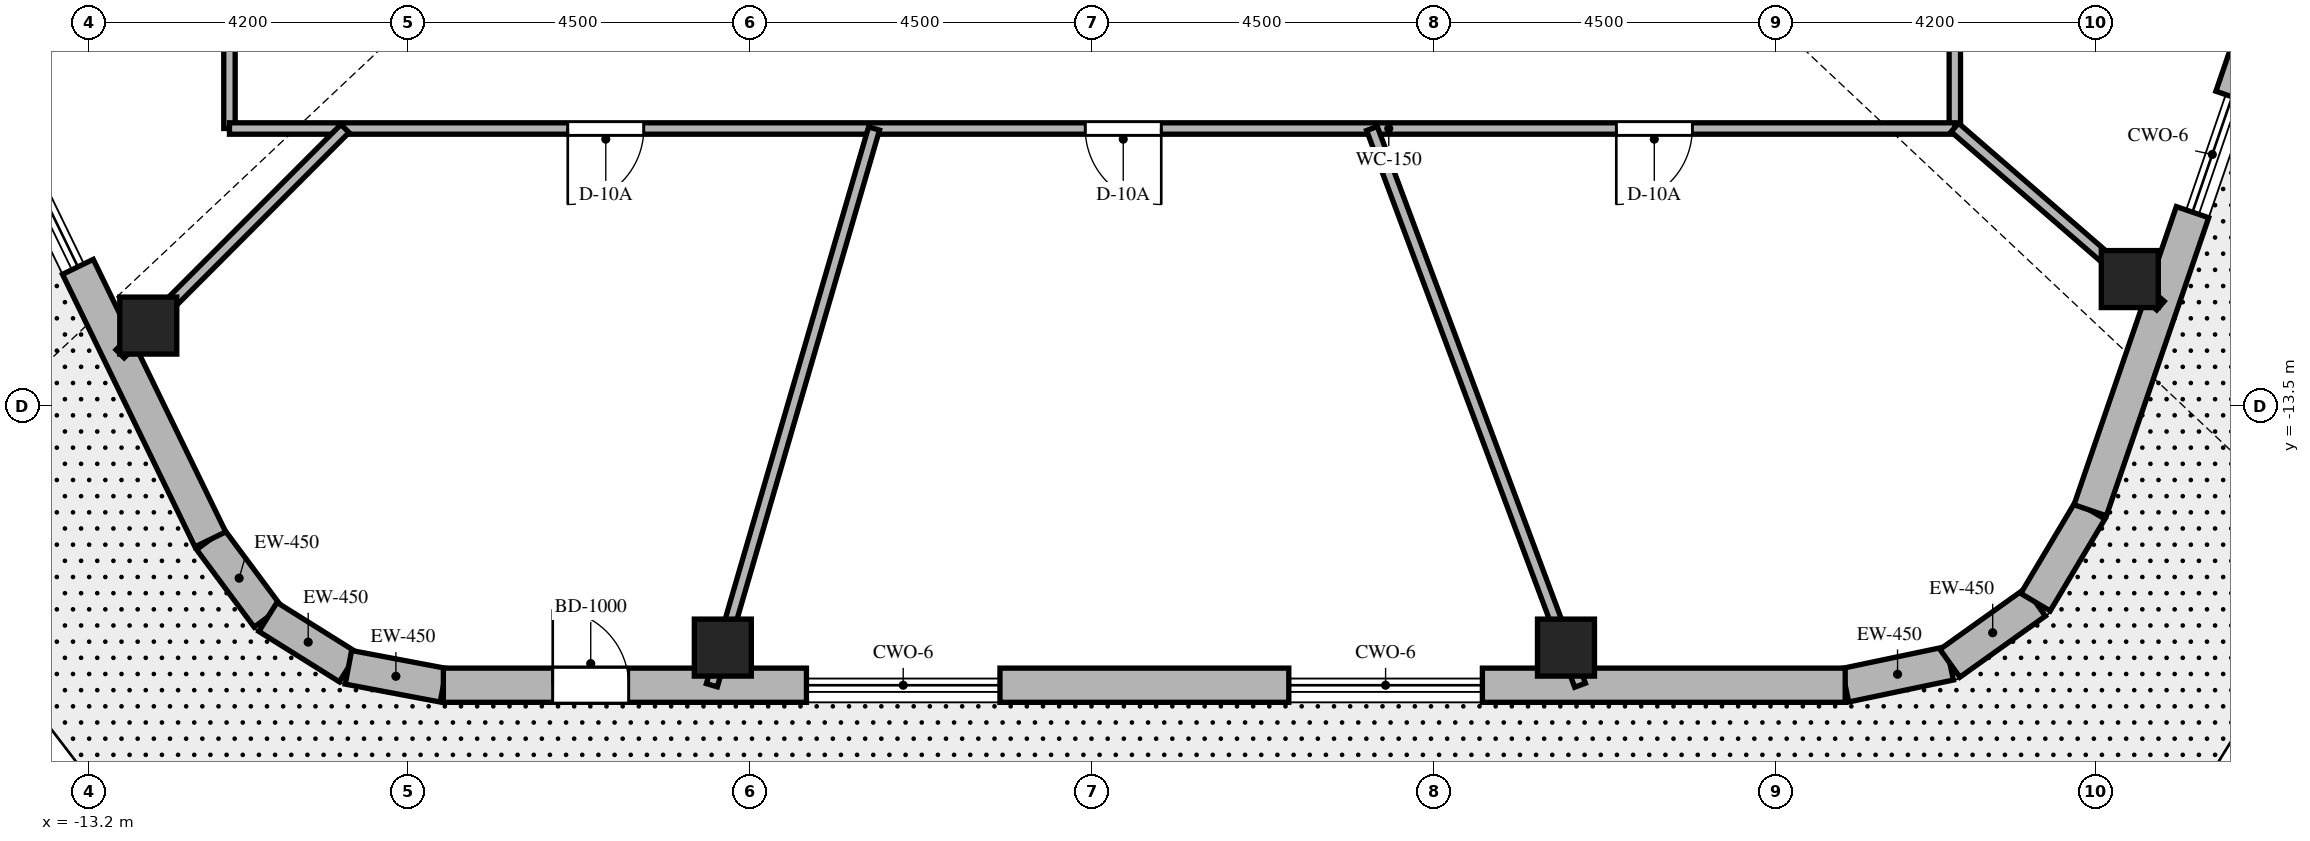
"""IFC4 building model, lengths in metres.
Left out: names, types, materials, properties, quantities, classifications, styles, units other than length and angle.
Written with IfcOpenShell. Run it as: python <this file> out.ifc"""

import sys

from ifc_helpers import new_model, si_unit, direction, frame, frame_2d, origin, origin_2d, place, context, subcontext, project, spatial, rectangle, extrude, element, fill, save


model = new_model("IFC4")
c1 = context("Model", 3, precision=1e-05, world=origin(), true_north=direction((0.0, 1.0)))
c2 = subcontext(c1, "Body", "Model", "MODEL_VIEW")
j1 = project(units=[si_unit("LENGTHUNIT", "METRE"), si_unit("PLANEANGLEUNIT", "RADIAN")], contexts=[c1])
p1 = place(None, origin())
s1 = spatial("IfcSite", under=j1, at=p1, CompositionType="ELEMENT")
p2 = place(p1, origin())
s2 = spatial("IfcBuilding", under=s1, at=p2, CompositionType="ELEMENT")
p3 = place(p2, frame((0.0, 0.0, 305.4)))
s3 = spatial("IfcBuildingStorey", under=s2, at=p3, CompositionType="ELEMENT", Elevation=305.4)
for number, where, z_axis, x_axis in (
    (1, (-4.859, -16.68, 0.0), (0.0, 0.0, 1.0), (1.0, 0.0, 0.0)),
    (2, (6.234, -16.68, 0.0), (0.0, 0.0, 1.0), (1.0, 0.0, 0.0)),
    (3, (13.652, -11.831, 0.0), (0.0, 0.0, 1.0), (1.0, 0.0, 0.0)),
    (4, (-12.418, -12.443, 0.0), (0.0, 0.0, 1.0), (1.0, 0.0, 0.0)),
):
    element("IfcColumn", number, at=place(p3, frame(where, z_axis=z_axis, x_axis=x_axis)), inside=s3, PredefinedType="COLUMN", context=c2, shape_type="SweptSolid", body=[
        extrude(rectangle(XDim=0.75, YDim=0.75, at=origin_2d()), origin(), (0.0, 0.0, 1.0), 5.0),
    ])
p4 = place(p3, frame((-11.602, -15.256, 0.0), z_axis=(0.0, 0.0, 1.0), x_axis=(0.596058719353, -0.802940846566, 0.0)))
e5 = element("IfcWall", 5, at=p4, inside=s3, PredefinedType="SOLIDWALL", context=c2, shape_type="SweptSolid", body=[
    extrude(rectangle(XDim=1.271, YDim=0.45, at=frame_2d((0.635, 0.0))), origin(), (0.0, 0.0, 1.0), 4.68),
])
p5 = place(p3, frame((-10.844, -16.277, 0.0), z_axis=(0.0, 0.0, 1.0), x_axis=(0.847723789959, -0.530437909597, 0.0)))
e6 = element("IfcWall", 6, at=p5, inside=s3, PredefinedType="SOLIDWALL", context=c2, shape_type="SweptSolid", body=[
    extrude(rectangle(XDim=1.25, YDim=0.45, at=frame_2d((0.625, 0.0))), origin(), (0.0, 0.0, 1.0), 4.68),
])
p6 = place(p3, frame((-9.785, -16.939, 0.0), z_axis=(0.0, 0.0, 1.0), x_axis=(0.982664955661, -0.185390358204, 0.0)))
e7 = element("IfcWall", 7, at=p6, inside=s3, PredefinedType="SOLIDWALL", context=c2, shape_type="SweptSolid", body=[
    extrude(rectangle(XDim=1.271, YDim=0.45, at=frame_2d((0.635, 0.0))), origin(), (0.0, 0.0, 1.0), 4.68),
])
p7 = place(p3, frame((9.908, -17.175, 0.0), z_axis=(0.0, 0.0, 1.0), x_axis=(0.978709642506, 0.205249691027, 0.0)))
e8 = element("IfcWall", 8, at=p7, inside=s3, PredefinedType="SOLIDWALL", context=c2, shape_type="SweptSolid", body=[
    extrude(rectangle(XDim=1.407, YDim=0.45, at=frame_2d((0.704, 0.0))), origin(), (0.0, 0.0, 1.0), 4.68),
])
p8 = place(p3, frame((11.285, -16.886, 0.0), z_axis=(0.0, 0.0, 1.0), x_axis=(0.813840765051, 0.581087953017, 0.0)))
e9 = element("IfcWall", 9, at=p8, inside=s3, PredefinedType="SOLIDWALL", context=c2, shape_type="SweptSolid", body=[
    extrude(rectangle(XDim=1.384, YDim=0.45, at=frame_2d((0.692, 0.0))), origin(), (0.0, 0.0, 1.0), 4.68),
])
p9 = place(p3, frame((12.411, -16.082, 0.0), z_axis=(0.0, 0.0, 1.0), x_axis=(0.511788829014, 0.859111281789, 0.0)))
e10 = element("IfcWall", 10, at=p9, inside=s3, PredefinedType="SOLIDWALL", context=c2, shape_type="SweptSolid", body=[
    extrude(rectangle(XDim=1.407, YDim=0.45, at=frame_2d((0.704, 0.0))), origin(), (0.0, 0.0, 1.0), 4.68),
])
p10 = place(p3, frame((-8.536, -17.175, 0.0), z_axis=(0.0, 0.0, 1.0), x_axis=(1.0, 0.0, 0.0)))
e11 = element("IfcWall", 11, at=p10, inside=s3, PredefinedType="SOLIDWALL", context=c2, shape_type="SweptSolid", body=[
    extrude(rectangle(XDim=4.777, YDim=0.45, at=frame_2d((2.389, 0.0))), origin(), (0.0, 0.0, 1.0), 4.68),
])
p11 = place(p10, frame((1.439, 0.0, 0.0)))
e12 = element("IfcOpeningElement", 12, at=p11, cuts=e11, PredefinedType="OPENING", context=c2, shape_type="SweptSolid", body=[
    extrude(rectangle(XDim=1.0, YDim=2.15, at=frame_2d((0.5, 1.075))), frame((0.0, 0.235, 0.0), z_axis=(0.0, -1.0, 0.0), x_axis=(1.0, 0.0, 0.0)), (0.0, 0.0, 1.0), 0.47),
])
p12 = place(p3, frame((-1.213, -17.175, 0.0), z_axis=(0.0, 0.0, 1.0), x_axis=(1.0, 0.0, 0.0)))
e13 = element("IfcWall", 13, at=p12, inside=s3, PredefinedType="SOLIDWALL", context=c2, shape_type="SweptSolid", body=[
    extrude(rectangle(XDim=3.8, YDim=0.45, at=frame_2d((1.9, 0.0))), origin(), (0.0, 0.0, 1.0), 4.68),
])
p13 = place(p3, frame((5.134, -17.175, 0.0), z_axis=(0.0, 0.0, 1.0), x_axis=(1.0, 0.0, 0.0)))
e14 = element("IfcWall", 14, at=p13, inside=s3, PredefinedType="SOLIDWALL", context=c2, shape_type="SweptSolid", body=[
    extrude(rectangle(XDim=4.773, YDim=0.45, at=frame_2d((2.387, 0.0))), origin(), (0.0, 0.0, 1.0), 4.68),
])
p14 = place(p3, frame((13.131, -14.873, 0.0), z_axis=(0.0, 0.0, 1.0), x_axis=(0.324498911717, 0.945886069405, 0.0)))
e15 = element("IfcWall", 15, at=p14, inside=s3, PredefinedType="SOLIDWALL", context=c2, shape_type="SweptSolid", body=[
    extrude(rectangle(XDim=4.147, YDim=0.45, at=frame_2d((2.073, 0.0))), origin(), (0.0, 0.0, 1.0), 4.68),
])
p15 = place(p3, frame((14.998, -9.433, 0.0), z_axis=(0.0, 0.0, 1.0), x_axis=(0.324503351443, 0.945884546286, 0.0)))
e16 = element("IfcWall", 16, at=p15, inside=s3, PredefinedType="SOLIDWALL", context=c2, shape_type="SweptSolid", body=[
    extrude(rectangle(XDim=3.8, YDim=0.45, at=frame_2d((1.9, 0.0))), origin(), (0.0, 0.0, 1.0), 4.68),
])
p16 = place(p3, frame((-13.344, -11.67, 0.0), z_axis=(0.0, 0.0, 1.0), x_axis=(0.437044105444, -0.899440075768, 0.0)))
e17 = element("IfcWall", 17, at=p16, inside=s3, PredefinedType="SOLIDWALL", context=c2, shape_type="SweptSolid", body=[
    extrude(rectangle(XDim=3.987, YDim=0.45, at=frame_2d((1.993, 0.0))), origin(), (0.0, 0.0, 1.0), 4.68),
])
p17 = place(p3, frame((-11.35, -9.85, 0.0), z_axis=(0.0, 0.0, 1.0), x_axis=(0.0, 1.0, 0.0)))
e18 = element("IfcWall", 18, at=p17, inside=s3, PredefinedType="PARTITIONING", context=c2, shape_type="SweptSolid", body=[
    extrude(rectangle(XDim=19.7, YDim=0.15, at=frame_2d((9.85, 0.0))), origin(), (0.0, 0.0, 1.0), 2.87),
])
p18 = place(p17, frame((15.219, 0.0, 0.0)))
e19 = element("IfcOpeningElement", 19, at=p18, cuts=e18, PredefinedType="OPENING", context=c2, shape_type="SweptSolid", body=[
    extrude(rectangle(XDim=1.0, YDim=2.03, at=frame_2d((0.5, 1.015))), frame((0.0, 0.085, 0.0), z_axis=(0.0, -1.0, 0.0), x_axis=(1.0, 0.0, 0.0)), (0.0, 0.0, 1.0), 0.17),
])
p19 = place(p17, frame((8.805, 0.0, 0.0)))
e20 = element("IfcOpeningElement", 20, at=p19, cuts=e18, PredefinedType="OPENING", context=c2, shape_type="SweptSolid", body=[
    extrude(rectangle(XDim=1.0, YDim=2.03, at=frame_2d((0.5, 1.015))), frame((0.0, 0.085, 0.0), z_axis=(0.0, -1.0, 0.0), x_axis=(1.0, 0.0, 0.0)), (0.0, 0.0, 1.0), 0.17),
])
p20 = place(p17, frame((2.938, 0.0, 0.0)))
e21 = element("IfcOpeningElement", 21, at=p20, cuts=e18, PredefinedType="OPENING", context=c2, shape_type="SweptSolid", body=[
    extrude(rectangle(XDim=1.0, YDim=2.03, at=frame_2d((0.5, 1.015))), frame((0.0, 0.085, 0.0), z_axis=(0.0, -1.0, 0.0), x_axis=(1.0, 0.0, 0.0)), (0.0, 0.0, 1.0), 0.17),
])
p21 = place(p3, frame((11.35, 9.85, 0.0), z_axis=(0.0, 0.0, 1.0), x_axis=(0.0, -1.0, 0.0)))
e22 = element("IfcWall", 22, at=p21, inside=s3, PredefinedType="PARTITIONING", context=c2, shape_type="SweptSolid", body=[
    extrude(rectangle(XDim=19.7, YDim=0.15, at=frame_2d((9.85, 0.0))), origin(), (0.0, 0.0, 1.0), 2.87),
])
p22 = place(p21, frame((2.938, 0.0, 0.0)))
e23 = element("IfcOpeningElement", 23, at=p22, cuts=e22, PredefinedType="OPENING", context=c2, shape_type="SweptSolid", body=[
    extrude(rectangle(XDim=1.0, YDim=2.03, at=frame_2d((0.5, 1.015))), frame((0.0, 0.085, 0.0), z_axis=(0.0, -1.0, 0.0), x_axis=(1.0, 0.0, 0.0)), (0.0, 0.0, 1.0), 0.17),
])
p23 = place(p21, frame((15.219, 0.0, 0.0)))
e24 = element("IfcOpeningElement", 24, at=p23, cuts=e22, PredefinedType="OPENING", context=c2, shape_type="SweptSolid", body=[
    extrude(rectangle(XDim=1.0, YDim=2.03, at=frame_2d((0.5, 1.015))), frame((0.0, 0.085, 0.0), z_axis=(0.0, -1.0, 0.0), x_axis=(1.0, 0.0, 0.0)), (0.0, 0.0, 1.0), 0.17),
])
p24 = place(p21, frame((8.805, 0.0, 0.0)))
e25 = element("IfcOpeningElement", 25, at=p24, cuts=e22, PredefinedType="OPENING", context=c2, shape_type="SweptSolid", body=[
    extrude(rectangle(XDim=1.0, YDim=2.03, at=frame_2d((0.5, 1.015))), frame((0.0, 0.085, 0.0), z_axis=(0.0, -1.0, 0.0), x_axis=(1.0, 0.0, 0.0)), (0.0, 0.0, 1.0), 0.17),
])
p25 = place(p3, frame((11.35, -9.85, 0.0), z_axis=(0.0, 0.0, 1.0), x_axis=(-1.0, 0.0, 0.0)))
e26 = element("IfcWall", 26, at=p25, inside=s3, PredefinedType="PARTITIONING", context=c2, shape_type="SweptSolid", body=[
    extrude(rectangle(XDim=22.7, YDim=0.15, at=frame_2d((11.35, 0.0))), origin(), (0.0, 0.0, 1.0), 2.87),
])
p26 = place(p25, frame((17.249, 0.0, 0.0)))
e27 = element("IfcOpeningElement", 27, at=p26, cuts=e26, PredefinedType="OPENING", context=c2, shape_type="SweptSolid", body=[
    extrude(rectangle(XDim=1.0, YDim=2.03, at=frame_2d((0.5, 1.015))), frame((0.0, 0.085, 0.0), z_axis=(0.0, -1.0, 0.0), x_axis=(1.0, 0.0, 0.0)), (0.0, 0.0, 1.0), 0.17),
])
p27 = place(p25, frame((10.441, 0.0, 0.0)))
e28 = element("IfcOpeningElement", 28, at=p27, cuts=e26, PredefinedType="OPENING", context=c2, shape_type="SweptSolid", body=[
    extrude(rectangle(XDim=1.0, YDim=2.03, at=frame_2d((0.5, 1.015))), frame((0.0, 0.085, 0.0), z_axis=(0.0, -1.0, 0.0), x_axis=(1.0, 0.0, 0.0)), (0.0, 0.0, 1.0), 0.17),
])
p28 = place(p25, frame((3.454, 0.0, 0.0)))
e29 = element("IfcOpeningElement", 29, at=p28, cuts=e26, PredefinedType="OPENING", context=c2, shape_type="SweptSolid", body=[
    extrude(rectangle(XDim=1.0, YDim=2.03, at=frame_2d((0.5, 1.015))), frame((0.0, 0.085, 0.0), z_axis=(0.0, -1.0, 0.0), x_axis=(1.0, 0.0, 0.0)), (0.0, 0.0, 1.0), 0.17),
])
p29 = place(p3, frame((-9.83, -9.85, 0.0), z_axis=(0.0, 0.0, 1.0), x_axis=(-0.706435999186, -0.707776927467, 0.0)))
e30 = element("IfcWall", 30, at=p29, inside=s3, PredefinedType="PARTITIONING", context=c2, shape_type="SweptSolid", body=[
    extrude(rectangle(XDim=4.188, YDim=0.15, at=frame_2d((2.094, 0.0))), origin(), (0.0, 0.0, 1.0), 2.87),
])
p30 = place(p3, frame((-2.869, -9.85, 0.0), z_axis=(0.0, 0.0, 1.0), x_axis=(-0.279679268414, -0.960093488583, 0.0)))
e31 = element("IfcWall", 31, at=p30, inside=s3, PredefinedType="PARTITIONING", context=c2, shape_type="SweptSolid", body=[
    extrude(rectangle(XDim=7.629, YDim=0.15, at=frame_2d((3.815, 0.0))), origin(), (0.0, 0.0, 1.0), 2.87),
])
p31 = place(p3, frame((3.681, -9.85, 0.0), z_axis=(0.0, 0.0, 1.0), x_axis=(0.350079676448, -0.936719926199, 0.0)))
e32 = element("IfcWall", 32, at=p31, inside=s3, PredefinedType="PARTITIONING", context=c2, shape_type="SweptSolid", body=[
    extrude(rectangle(XDim=7.82, YDim=0.15, at=frame_2d((3.91, 0.0))), origin(), (0.0, 0.0, 1.0), 2.87),
])
p32 = place(p3, frame((11.35, -9.836, 0.0), z_axis=(0.0, 0.0, 1.0), x_axis=(0.755716089778, -0.65489937521, 0.0)))
e33 = element("IfcWall", 33, at=p32, inside=s3, PredefinedType="PARTITIONING", context=c2, shape_type="SweptSolid", body=[
    extrude(rectangle(XDim=3.579, YDim=0.15, at=frame_2d((1.79, 0.0))), origin(), (0.0, 0.0, 1.0), 2.87),
])
p33 = place(p11, origin())
e34 = element("IfcDoor", 34, at=p33, inside=s3, OperationType="SINGLE_SWING_LEFT", PredefinedType="DOOR", context=c2, shape_type="SweptSolid", body=[
    extrude(rectangle(XDim=1.0, YDim=2.15, at=frame_2d((0.5, 1.075))), frame((0.0, 0.025, 0.0), z_axis=(0.0, -1.0, 0.0), x_axis=(1.0, 0.0, 0.0)), (0.0, 0.0, 1.0), 0.05),
])
fill(e12, e34)
p34 = place(p26, origin())
e35 = element("IfcDoor", 35, at=p34, inside=s3, OperationType="SINGLE_SWING_RIGHT", PredefinedType="DOOR", context=c2, shape_type="SweptSolid", body=[
    extrude(rectangle(XDim=1.0, YDim=2.03, at=frame_2d((0.5, 1.015))), frame((0.0, 0.025, 0.0), z_axis=(0.0, -1.0, 0.0), x_axis=(1.0, 0.0, 0.0)), (0.0, 0.0, 1.0), 0.05),
])
fill(e27, e35)
p35 = place(p27, origin())
e36 = element("IfcDoor", 36, at=p35, inside=s3, OperationType="SINGLE_SWING_LEFT", PredefinedType="DOOR", context=c2, shape_type="SweptSolid", body=[
    extrude(rectangle(XDim=1.0, YDim=2.03, at=frame_2d((0.5, 1.015))), frame((0.0, 0.025, 0.0), z_axis=(0.0, -1.0, 0.0), x_axis=(1.0, 0.0, 0.0)), (0.0, 0.0, 1.0), 0.05),
])
fill(e28, e36)
p36 = place(p28, origin())
e37 = element("IfcDoor", 37, at=p36, inside=s3, OperationType="SINGLE_SWING_RIGHT", PredefinedType="DOOR", context=c2, shape_type="SweptSolid", body=[
    extrude(rectangle(XDim=1.0, YDim=2.03, at=frame_2d((0.5, 1.015))), frame((0.0, 0.025, 0.0), z_axis=(0.0, -1.0, 0.0), x_axis=(1.0, 0.0, 0.0)), (0.0, 0.0, 1.0), 0.05),
])
fill(e29, e37)
save(model, sys.argv[1])
